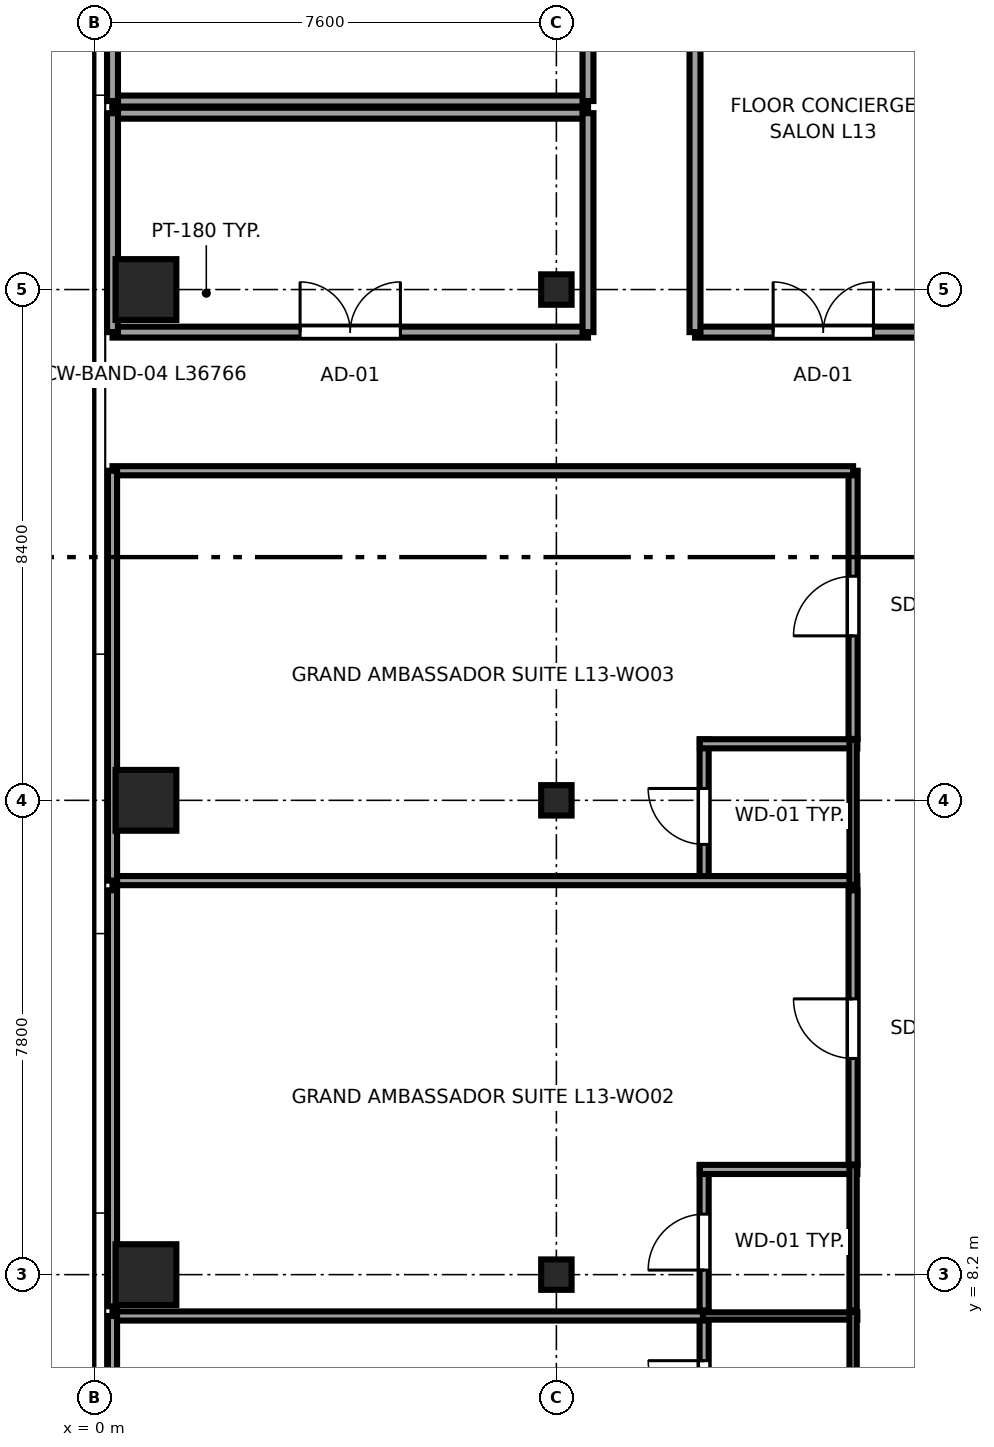
"""IFC4 building model, lengths in metres.
Left out: names, types, materials, properties, quantities, classifications, styles, units other than length and angle.
Written with IfcOpenShell. Run it as: python <this file> out.ifc"""

import sys

from ifc_helpers import new_model, si_unit, direction, frame, frame_2d, origin, origin_2d, place, context, subcontext, project, spatial, rectangle, i_section, extrude, source, transform, mapped, element, fill, save


model = new_model("IFC4")
c1 = context("Model", 3, precision=1e-05, world=origin(), true_north=direction((0.0, 1.0)))
c2 = subcontext(c1, "Body", "Model", "MODEL_VIEW")
j1 = project(units=[si_unit("LENGTHUNIT", "METRE"), si_unit("PLANEANGLEUNIT", "RADIAN")], contexts=[c1])
p1 = place(None, origin())
s1 = spatial("IfcSite", under=j1, at=p1, CompositionType="ELEMENT")
p2 = place(p1, origin())
s2 = spatial("IfcBuilding", under=s1, at=p2, CompositionType="ELEMENT")
p3 = place(p2, frame((0.0, 0.0, 56.85)))
s3 = spatial("IfcBuildingStorey", under=s2, at=p3, CompositionType="ELEMENT", Elevation=56.85)
m1 = source(origin(), c2, "Body", "SweptSolid", [
    extrude(rectangle(XDim=1.0, YDim=1.0, at=origin_2d()), origin(), (0.0, 0.0, 1.0), 3.55),
])
for number, where, z_axis, x_axis in (
    (1, (0.85, 8.2, 0.0), (0.0, 0.0, 1.0), (1.0, 0.0, 0.0)),
    (2, (0.85, 16.0, 0.0), (0.0, 0.0, 1.0), (1.0, 0.0, 0.0)),
    (3, (0.85, 24.4, 0.0), (0.0, 0.0, 1.0), (1.0, 0.0, 0.0)),
):
    element("IfcColumn", number, at=place(p3, frame(where, z_axis=z_axis, x_axis=x_axis)), inside=s3, PredefinedType="COLUMN", context=c2, shape_type="MappedRepresentation", body=[
        mapped(m1, transform((0.0, 0.0, 0.0), x_axis=(1.0, 0.0, 0.0), y_axis=(0.0, 1.0, 0.0), z_axis=(0.0, 0.0, 1.0), scale=1.0)),
    ])
m2 = source(origin(), c2, "Body", "SweptSolid", [
    extrude(i_section(OverallWidth=0.5, OverallDepth=0.5, WebThickness=0.028, FlangeThickness=0.045, at=origin_2d()), origin(), (0.0, 0.0, 1.0), 3.55),
])
for number, where, z_axis, x_axis in (
    (4, (7.6, 8.2, 0.0), (0.0, 0.0, 1.0), (1.0, 0.0, 0.0)),
    (5, (7.6, 16.0, 0.0), (0.0, 0.0, 1.0), (1.0, 0.0, 0.0)),
    (6, (7.6, 24.4, 0.0), (0.0, 0.0, 1.0), (1.0, 0.0, 0.0)),
):
    element("IfcColumn", number, at=place(p3, frame(where, z_axis=z_axis, x_axis=x_axis)), inside=s3, PredefinedType="COLUMN", context=c2, shape_type="MappedRepresentation", body=[
        mapped(m2, transform((0.0, 0.0, 0.0), x_axis=(1.0, 0.0, 0.0), y_axis=(0.0, 1.0, 0.0), z_axis=(0.0, 0.0, 1.0), scale=1.0)),
    ])
p4 = place(p3, frame((10.03, 5.2, 0.0), z_axis=(0.0, 0.0, 1.0), x_axis=(0.0, 1.0, 0.0)))
e7 = element("IfcWall", 7, at=p4, inside=s3, PredefinedType="PARTITIONING", context=c2, shape_type="SweptSolid", body=[
    extrude(rectangle(XDim=2.39, YDim=0.15, at=frame_2d((1.195, 0.0))), origin(), (0.0, 0.0, 1.0), 3.37),
])
p5 = place(p4, frame((0.665, 0.0, 0.0)))
e8 = element("IfcOpeningElement", 8, at=p5, cuts=e7, PredefinedType="OPENING", context=c2, shape_type="SweptSolid", body=[
    extrude(rectangle(XDim=0.92, YDim=2.01, at=frame_2d((0.46, 1.005))), frame((0.0, 0.085, 0.0), z_axis=(0.0, -1.0, 0.0), x_axis=(1.0, 0.0, 0.0)), (0.0, 0.0, 1.0), 0.17),
])
p6 = place(p3, frame((9.96, 7.52, 0.0), z_axis=(0.0, 0.0, 1.0), x_axis=(1.0, 0.0, 0.0)))
e9 = element("IfcWall", 9, at=p6, inside=s3, PredefinedType="PLUMBINGWALL", context=c2, shape_type="SweptSolid", body=[
    extrude(rectangle(XDim=2.59, YDim=0.12, at=frame_2d((1.295, 0.0))), origin(), (0.0, 0.0, 1.0), 3.37),
])
p7 = place(p3, frame((12.48, 5.2, 0.0), z_axis=(0.0, 0.0, 1.0), x_axis=(0.0, 1.0, 0.0)))
e10 = element("IfcWall", 10, at=p7, inside=s3, PredefinedType="PLUMBINGWALL", context=c2, shape_type="SweptSolid", body=[
    extrude(rectangle(XDim=2.39, YDim=0.12, at=frame_2d((1.195, 0.0))), origin(), (0.0, 0.0, 1.0), 3.37),
])
p8 = place(p3, frame((10.03, 7.61, 0.0), z_axis=(0.0, 0.0, 1.0), x_axis=(0.0, 1.0, 0.0)))
e11 = element("IfcWall", 11, at=p8, inside=s3, PredefinedType="PARTITIONING", context=c2, shape_type="SweptSolid", body=[
    extrude(rectangle(XDim=2.39, YDim=0.15, at=frame_2d((1.195, 0.0))), origin(), (0.0, 0.0, 1.0), 3.37),
])
p9 = place(p8, frame((0.665, 0.0, 0.0)))
e12 = element("IfcOpeningElement", 12, at=p9, cuts=e11, PredefinedType="OPENING", context=c2, shape_type="SweptSolid", body=[
    extrude(rectangle(XDim=0.92, YDim=2.01, at=frame_2d((0.46, 1.005))), frame((0.0, 0.085, 0.0), z_axis=(0.0, -1.0, 0.0), x_axis=(1.0, 0.0, 0.0)), (0.0, 0.0, 1.0), 0.17),
])
p10 = place(p3, frame((9.96, 9.93, 0.0), z_axis=(0.0, 0.0, 1.0), x_axis=(1.0, 0.0, 0.0)))
e13 = element("IfcWall", 13, at=p10, inside=s3, PredefinedType="PARTITIONING", context=c2, shape_type="SweptSolid", body=[
    extrude(rectangle(XDim=2.59, YDim=0.15, at=frame_2d((1.295, 0.0))), origin(), (0.0, 0.0, 1.0), 3.37),
])
p11 = place(p3, frame((12.48, 7.61, 0.0), z_axis=(0.0, 0.0, 1.0), x_axis=(0.0, 1.0, 0.0)))
e14 = element("IfcWall", 14, at=p11, inside=s3, PredefinedType="PLUMBINGWALL", context=c2, shape_type="SweptSolid", body=[
    extrude(rectangle(XDim=2.39, YDim=0.12, at=frame_2d((1.195, 0.0))), origin(), (0.0, 0.0, 1.0), 3.37),
])
p12 = place(p3, frame((10.03, 14.61, 0.0), z_axis=(0.0, 0.0, 1.0), x_axis=(0.0, 1.0, 0.0)))
e15 = element("IfcWall", 15, at=p12, inside=s3, PredefinedType="PARTITIONING", context=c2, shape_type="SweptSolid", body=[
    extrude(rectangle(XDim=2.39, YDim=0.15, at=frame_2d((1.195, 0.0))), origin(), (0.0, 0.0, 1.0), 3.37),
])
p13 = place(p12, frame((0.665, 0.0, 0.0)))
e16 = element("IfcOpeningElement", 16, at=p13, cuts=e15, PredefinedType="OPENING", context=c2, shape_type="SweptSolid", body=[
    extrude(rectangle(XDim=0.92, YDim=2.01, at=frame_2d((0.46, 1.005))), frame((0.0, 0.085, 0.0), z_axis=(0.0, -1.0, 0.0), x_axis=(1.0, 0.0, 0.0)), (0.0, 0.0, 1.0), 0.17),
])
p14 = place(p3, frame((0.3, 14.68, 0.0), z_axis=(0.0, 0.0, 1.0), x_axis=(1.0, 0.0, 0.0)))
e17 = element("IfcWall", 17, at=p14, inside=s3, PredefinedType="PARTITIONING", context=c2, shape_type="SweptSolid", body=[
    extrude(rectangle(XDim=12.25, YDim=0.15, at=frame_2d((6.125, 0.0))), origin(), (0.0, 0.0, 1.0), 3.37),
])
p15 = place(p3, frame((9.96, 16.93, 0.0), z_axis=(0.0, 0.0, 1.0), x_axis=(1.0, 0.0, 0.0)))
e18 = element("IfcWall", 18, at=p15, inside=s3, PredefinedType="PARTITIONING", context=c2, shape_type="SweptSolid", body=[
    extrude(rectangle(XDim=2.59, YDim=0.15, at=frame_2d((1.295, 0.0))), origin(), (0.0, 0.0, 1.0), 3.37),
])
p16 = place(p3, frame((12.48, 14.61, 0.0), z_axis=(0.0, 0.0, 1.0), x_axis=(0.0, 1.0, 0.0)))
e19 = element("IfcWall", 19, at=p16, inside=s3, PredefinedType="PLUMBINGWALL", context=c2, shape_type="SweptSolid", body=[
    extrude(rectangle(XDim=2.39, YDim=0.12, at=frame_2d((1.195, 0.0))), origin(), (0.0, 0.0, 1.0), 3.37),
])
p17 = place(p3, frame((0.3, 7.52, 0.0), z_axis=(0.0, 0.0, 1.0), x_axis=(1.0, 0.0, 0.0)))
e20 = element("IfcWall", 20, at=p17, inside=s3, PredefinedType="PARTITIONING", context=c2, shape_type="SweptSolid", body=[
    extrude(rectangle(XDim=9.71, YDim=0.15, at=frame_2d((4.855, 0.0))), origin(), (0.0, 0.0, 1.0), 3.37),
])
p18 = place(p3, frame((0.3, 4.642, 0.0), z_axis=(0.0, 0.0, 1.0), x_axis=(0.0, 1.0, 0.0)))
e21 = element("IfcWall", 21, at=p18, inside=s3, PredefinedType="PARTITIONING", context=c2, shape_type="SweptSolid", body=[
    extrude(rectangle(XDim=2.878, YDim=0.15, at=frame_2d((1.439, 0.0))), origin(), (0.0, 0.0, 1.0), 3.37),
])
p19 = place(p3, frame((12.48, 10.01, 0.0), z_axis=(0.0, 0.0, 1.0), x_axis=(0.0, 1.0, 0.0)))
e22 = element("IfcWall", 22, at=p19, inside=s3, PredefinedType="PARTITIONING", context=c2, shape_type="SweptSolid", body=[
    extrude(rectangle(XDim=4.51, YDim=0.15, at=frame_2d((2.255, 0.0))), origin(), (0.0, 0.0, 1.0), 3.37),
])
p20 = place(p19, frame((1.745, 0.0, 0.0)))
e23 = element("IfcOpeningElement", 23, at=p20, cuts=e22, PredefinedType="OPENING", context=c2, shape_type="SweptSolid", body=[
    extrude(rectangle(XDim=0.98, YDim=2.12, at=frame_2d((0.49, 1.06))), frame((0.0, 0.085, 0.0), z_axis=(0.0, -1.0, 0.0), x_axis=(1.0, 0.0, 0.0)), (0.0, 0.0, 1.0), 0.17),
])
p21 = place(p3, frame((0.3, 7.68, 0.0), z_axis=(0.0, 0.0, 1.0), x_axis=(0.0, 1.0, 0.0)))
e24 = element("IfcWall", 24, at=p21, inside=s3, PredefinedType="PARTITIONING", context=c2, shape_type="SweptSolid", body=[
    extrude(rectangle(XDim=6.84, YDim=0.15, at=frame_2d((3.42, 0.0))), origin(), (0.0, 0.0, 1.0), 3.37),
])
p22 = place(p3, frame((12.48, 17.01, 0.0), z_axis=(0.0, 0.0, 1.0), x_axis=(0.0, 1.0, 0.0)))
e25 = element("IfcWall", 25, at=p22, inside=s3, PredefinedType="PARTITIONING", context=c2, shape_type="SweptSolid", body=[
    extrude(rectangle(XDim=4.41, YDim=0.15, at=frame_2d((2.205, 0.0))), origin(), (0.0, 0.0, 1.0), 3.37),
])
p23 = place(p22, frame((1.695, 0.0, 0.0)))
e26 = element("IfcOpeningElement", 26, at=p23, cuts=e25, PredefinedType="OPENING", context=c2, shape_type="SweptSolid", body=[
    extrude(rectangle(XDim=0.98, YDim=2.12, at=frame_2d((0.49, 1.06))), frame((0.0, 0.085, 0.0), z_axis=(0.0, -1.0, 0.0), x_axis=(1.0, 0.0, 0.0)), (0.0, 0.0, 1.0), 0.17),
])
p24 = place(p3, frame((0.3, 21.42, 0.0), z_axis=(0.0, 0.0, 1.0), x_axis=(1.0, 0.0, 0.0)))
e27 = element("IfcWall", 27, at=p24, inside=s3, PredefinedType="PARTITIONING", context=c2, shape_type="SweptSolid", body=[
    extrude(rectangle(XDim=12.18, YDim=0.15, at=frame_2d((6.09, 0.0))), origin(), (0.0, 0.0, 1.0), 3.37),
])
p25 = place(p3, frame((0.3, 14.68, 0.0), z_axis=(0.0, 0.0, 1.0), x_axis=(0.0, 1.0, 0.0)))
e28 = element("IfcWall", 28, at=p25, inside=s3, PredefinedType="PARTITIONING", context=c2, shape_type="SweptSolid", body=[
    extrude(rectangle(XDim=6.74, YDim=0.15, at=frame_2d((3.37, 0.0))), origin(), (0.0, 0.0, 1.0), 3.37),
])
p26 = place(p3, frame((0.3, 23.7, 0.0), z_axis=(0.0, 0.0, 1.0), x_axis=(1.0, 0.0, 0.0)))
e29 = element("IfcWall", 29, at=p26, inside=s3, PredefinedType="PARTITIONING", context=c2, shape_type="SweptSolid", body=[
    extrude(rectangle(XDim=7.82, YDim=0.18, at=frame_2d((3.91, 0.0))), origin(), (0.0, 0.0, 1.0), 3.37),
])
p27 = place(p26, frame((3.085, 0.0, 0.0)))
e30 = element("IfcOpeningElement", 30, at=p27, cuts=e29, PredefinedType="OPENING", context=c2, shape_type="SweptSolid", body=[
    extrude(rectangle(XDim=1.65, YDim=2.15, at=frame_2d((0.825, 1.075))), frame((0.0, 0.1, 0.0), z_axis=(0.0, -1.0, 0.0), x_axis=(1.0, 0.0, 0.0)), (0.0, 0.0, 1.0), 0.2),
])
p28 = place(p3, frame((0.3, 27.3, 0.0), z_axis=(0.0, 0.0, 1.0), x_axis=(1.0, 0.0, 0.0)))
e31 = element("IfcWall", 31, at=p28, inside=s3, PredefinedType="PARTITIONING", context=c2, shape_type="SweptSolid", body=[
    extrude(rectangle(XDim=7.82, YDim=0.18, at=frame_2d((3.91, 0.0))), origin(), (0.0, 0.0, 1.0), 3.37),
])
for number, where, z_axis, x_axis in (
    (32, (0.3, 23.7, 0.0), (0.0, 0.0, 1.0), (0.0, 1.0, 0.0)),
    (33, (8.12, 23.7, 0.0), (0.0, 0.0, 1.0), (0.0, 1.0, 0.0)),
):
    element("IfcWall", number, at=place(p3, frame(where, z_axis=z_axis, x_axis=x_axis)), inside=s3, PredefinedType="PARTITIONING", context=c2, shape_type="SweptSolid", body=[
        extrude(rectangle(XDim=3.6, YDim=0.18, at=frame_2d((1.8, 0.0))), origin(), (0.0, 0.0, 1.0), 3.37),
    ])
p29 = place(p3, frame((0.3, 27.5, 0.0), z_axis=(0.0, 0.0, 1.0), x_axis=(1.0, 0.0, 0.0)))
e34 = element("IfcWall", 34, at=p29, inside=s3, PredefinedType="PARTITIONING", context=c2, shape_type="SweptSolid", body=[
    extrude(rectangle(XDim=7.82, YDim=0.18, at=frame_2d((3.91, 0.0))), origin(), (0.0, 0.0, 1.0), 3.37),
])
p30 = place(p3, frame((0.3, 27.5, 0.0), z_axis=(0.0, 0.0, 1.0), x_axis=(0.0, 1.0, 0.0)))
e35 = element("IfcWall", 35, at=p30, inside=s3, PredefinedType="PARTITIONING", context=c2, shape_type="SweptSolid", body=[
    extrude(rectangle(XDim=3.6, YDim=0.18, at=frame_2d((1.8, 0.0))), origin(), (0.0, 0.0, 1.0), 3.37),
])
p31 = place(p3, frame((8.12, 27.5, 0.0), z_axis=(0.0, 0.0, 1.0), x_axis=(0.0, 1.0, 0.0)))
e36 = element("IfcWall", 36, at=p31, inside=s3, PredefinedType="PARTITIONING", context=c2, shape_type="SweptSolid", body=[
    extrude(rectangle(XDim=3.6, YDim=0.18, at=frame_2d((1.8, 0.0))), origin(), (0.0, 0.0, 1.0), 3.37),
])
p32 = place(p31, frame((0.975, 0.0, 0.0)))
e37 = element("IfcOpeningElement", 37, at=p32, cuts=e36, PredefinedType="OPENING", context=c2, shape_type="SweptSolid", body=[
    extrude(rectangle(XDim=1.65, YDim=2.15, at=frame_2d((0.825, 1.075))), frame((0.0, 0.1, 0.0), z_axis=(0.0, -1.0, 0.0), x_axis=(1.0, 0.0, 0.0)), (0.0, 0.0, 1.0), 0.2),
])
p33 = place(p3, frame((9.88, 23.7, 0.0), z_axis=(0.0, 0.0, 1.0), x_axis=(1.0, 0.0, 0.0)))
e38 = element("IfcWall", 38, at=p33, inside=s3, PredefinedType="PARTITIONING", context=c2, shape_type="SweptSolid", body=[
    extrude(rectangle(XDim=4.22, YDim=0.18, at=frame_2d((2.11, 0.0))), origin(), (0.0, 0.0, 1.0), 3.37),
])
p34 = place(p33, frame((1.285, 0.0, 0.0)))
e39 = element("IfcOpeningElement", 39, at=p34, cuts=e38, PredefinedType="OPENING", context=c2, shape_type="SweptSolid", body=[
    extrude(rectangle(XDim=1.65, YDim=2.15, at=frame_2d((0.825, 1.075))), frame((0.0, 0.1, 0.0), z_axis=(0.0, -1.0, 0.0), x_axis=(1.0, 0.0, 0.0)), (0.0, 0.0, 1.0), 0.2),
])
p35 = place(p3, frame((9.88, 23.7, 0.0), z_axis=(0.0, 0.0, 1.0), x_axis=(0.0, 1.0, 0.0)))
e40 = element("IfcWall", 40, at=p35, inside=s3, PredefinedType="PARTITIONING", context=c2, shape_type="SweptSolid", body=[
    extrude(rectangle(XDim=6.05, YDim=0.18, at=frame_2d((3.025, 0.0))), origin(), (0.0, 0.0, 1.0), 3.37),
])
m3 = source(origin(), c2, "Body", "SweptSolid", [
    extrude(rectangle(XDim=0.92, YDim=2.01, at=frame_2d((0.46, 1.005))), frame((0.0, 0.025, 0.0), z_axis=(0.0, -1.0, 0.0), x_axis=(1.0, 0.0, 0.0)), (0.0, 0.0, 1.0), 0.05),
])
p36 = place(p5, origin())
e41 = element("IfcDoor", 41, at=p36, inside=s3, OperationType="SINGLE_SWING_RIGHT", PredefinedType="DOOR", context=c2, shape_type="MappedRepresentation", body=[
    mapped(m3, transform((0.0, 0.0, 0.0), x_axis=(1.0, 0.0, 0.0), y_axis=(0.0, 1.0, 0.0), z_axis=(0.0, 0.0, 1.0), scale=1.0)),
])
fill(e8, e41)
p37 = place(p9, origin())
e42 = element("IfcDoor", 42, at=p37, inside=s3, OperationType="SINGLE_SWING_LEFT", PredefinedType="DOOR", context=c2, shape_type="MappedRepresentation", body=[
    mapped(m3, transform((0.0, 0.0, 0.0), x_axis=(1.0, 0.0, 0.0), y_axis=(0.0, 1.0, 0.0), z_axis=(0.0, 0.0, 1.0), scale=1.0)),
])
fill(e12, e42)
p38 = place(p13, origin())
e43 = element("IfcDoor", 43, at=p38, inside=s3, OperationType="SINGLE_SWING_RIGHT", PredefinedType="DOOR", context=c2, shape_type="MappedRepresentation", body=[
    mapped(m3, transform((0.0, 0.0, 0.0), x_axis=(1.0, 0.0, 0.0), y_axis=(0.0, 1.0, 0.0), z_axis=(0.0, 0.0, 1.0), scale=1.0)),
])
fill(e16, e43)
m4 = source(origin(), c2, "Body", "SweptSolid", [
    extrude(rectangle(XDim=0.98, YDim=2.12, at=frame_2d((0.49, 1.06))), frame((0.0, 0.025, 0.0), z_axis=(0.0, -1.0, 0.0), x_axis=(1.0, 0.0, 0.0)), (0.0, 0.0, 1.0), 0.05),
])
p39 = place(p20, origin())
e44 = element("IfcDoor", 44, at=p39, inside=s3, OperationType="SINGLE_SWING_RIGHT", PredefinedType="DOOR", context=c2, shape_type="MappedRepresentation", body=[
    mapped(m4, transform((0.0, 0.0, 0.0), x_axis=(1.0, 0.0, 0.0), y_axis=(0.0, 1.0, 0.0), z_axis=(0.0, 0.0, 1.0), scale=1.0)),
])
fill(e23, e44)
p40 = place(p23, origin())
e45 = element("IfcDoor", 45, at=p40, inside=s3, OperationType="SINGLE_SWING_LEFT", PredefinedType="DOOR", context=c2, shape_type="MappedRepresentation", body=[
    mapped(m4, transform((0.0, 0.0, 0.0), x_axis=(1.0, 0.0, 0.0), y_axis=(0.0, 1.0, 0.0), z_axis=(0.0, 0.0, 1.0), scale=1.0)),
])
fill(e26, e45)
m5 = source(origin(), c2, "Body", "SweptSolid", [
    extrude(rectangle(XDim=1.65, YDim=2.15, at=frame_2d((0.825, 1.075))), frame((0.0, 0.025, 0.0), z_axis=(0.0, -1.0, 0.0), x_axis=(1.0, 0.0, 0.0)), (0.0, 0.0, 1.0), 0.05),
])
p41 = place(p27, origin())
e46 = element("IfcDoor", 46, at=p41, inside=s3, OperationType="DOUBLE_DOOR_SINGLE_SWING", PredefinedType="DOOR", context=c2, shape_type="MappedRepresentation", body=[
    mapped(m5, transform((0.0, 0.0, 0.0), x_axis=(1.0, 0.0, 0.0), y_axis=(0.0, 1.0, 0.0), z_axis=(0.0, 0.0, 1.0), scale=1.0)),
])
fill(e30, e46)
p42 = place(p34, origin())
e47 = element("IfcDoor", 47, at=p42, inside=s3, OperationType="DOUBLE_DOOR_SINGLE_SWING", PredefinedType="DOOR", context=c2, shape_type="MappedRepresentation", body=[
    mapped(m5, transform((0.0, 0.0, 0.0), x_axis=(1.0, 0.0, 0.0), y_axis=(0.0, 1.0, 0.0), z_axis=(0.0, 0.0, 1.0), scale=1.0)),
])
fill(e39, e47)
save(model, sys.argv[1])
